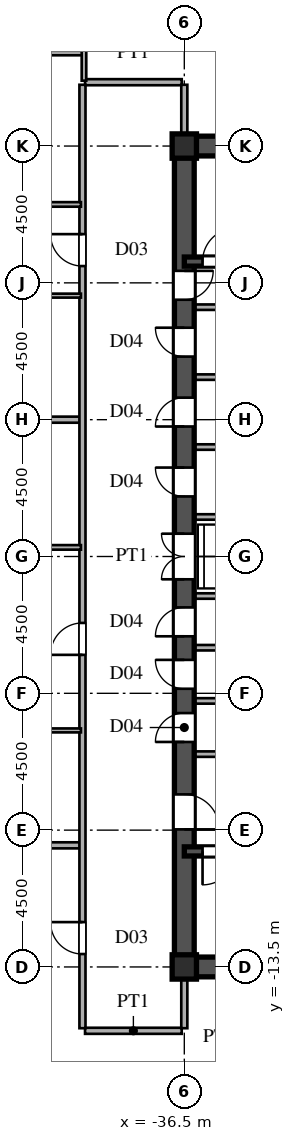
"""IFC4 building model, lengths in metres.
Left out: names, types, materials, properties, quantities, classifications, styles, units other than length and angle.
Written with IfcOpenShell. Run it as: python <this file> out.ifc"""

import sys

from ifc_helpers import new_model, si_unit, direction, frame, frame_2d, origin, origin_2d, place, context, subcontext, project, spatial, rectangle, i_section, extrude, source, transform, mapped, element, fill, save


model = new_model("IFC4")
c1 = context("Model", 3, precision=1e-05, world=origin(), true_north=direction((0.0, 1.0)))
c2 = subcontext(c1, "Body", "Model", "MODEL_VIEW")
j1 = project(units=[si_unit("LENGTHUNIT", "METRE"), si_unit("PLANEANGLEUNIT", "RADIAN")], contexts=[c1])
p1 = place(None, origin())
s1 = spatial("IfcSite", under=j1, at=p1, CompositionType="ELEMENT")
p2 = place(p1, origin())
s2 = spatial("IfcBuilding", under=s1, at=p2, CompositionType="ELEMENT")
p3 = place(p2, frame((0.0, 0.0, 80.1)))
s3 = spatial("IfcBuildingStorey", under=s2, at=p3, CompositionType="ELEMENT", Elevation=80.1)
m1 = source(origin(), c2, "Body", "SweptSolid", [
    extrude(i_section(OverallWidth=0.8, OverallDepth=0.8, WebThickness=0.032, FlangeThickness=0.05, at=origin_2d()), origin(), (0.0, 0.0, 1.0), 3.6),
])
for number, where, z_axis, x_axis in (
    (1, (-36.5, -13.5, 0.0), (0.0, 0.0, 1.0), (1.0, 0.0, 0.0)),
    (2, (-36.5, 13.5, 0.0), (0.0, 0.0, 1.0), (1.0, 0.0, 0.0)),
):
    element("IfcColumn", number, at=place(p3, frame(where, z_axis=z_axis, x_axis=x_axis)), inside=s3, PredefinedType="COLUMN", context=c2, shape_type="MappedRepresentation", body=[
        mapped(m1, transform((0.0, 0.0, 0.0), scale=1.0)),
    ])
for number, where, z_axis, x_axis in (
    (3, (-36.5, -13.5, 0.0), (0.0, 0.0, 1.0), (1.0, 0.0, 0.0)),
    (4, (-36.5, 13.5, 0.0), (0.0, 0.0, 1.0), (1.0, 0.0, 0.0)),
):
    element("IfcWall", number, at=place(p3, frame(where, z_axis=z_axis, x_axis=x_axis)), inside=s3, PredefinedType="SHEAR", context=c2, shape_type="SweptSolid", body=[
        extrude(rectangle(XDim=9.0, YDim=0.65, at=frame_2d((4.5, 0.0))), origin(), (0.0, 0.0, 1.0), 3.38),
    ])
p4 = place(p3, frame((-36.5, -13.65, 0.0), z_axis=(0.0, 0.0, 1.0), x_axis=(0.0, 1.0, 0.0)))
e5 = element("IfcWall", 5, at=p4, inside=s3, PredefinedType="SHEAR", context=c2, shape_type="SweptSolid", body=[
    extrude(rectangle(XDim=7.15, YDim=0.65, at=frame_2d((3.575, 0.0))), origin(), (0.0, 0.0, 1.0), 3.38),
])
p5 = place(p4, frame((4.675, 0.0, 0.0)))
e6 = element("IfcOpeningElement", 6, at=p5, cuts=e5, PredefinedType="OPENING", context=c2, shape_type="SweptSolid", body=[
    extrude(rectangle(XDim=1.15, YDim=2.2, at=frame_2d((0.575, 1.1))), frame((0.0, 0.335, 0.0), z_axis=(0.0, -1.0, 0.0), x_axis=(1.0, 0.0, 0.0)), (0.0, 0.0, 1.0), 0.67),
])
p6 = place(p3, frame((-36.5, -1.3, 0.0), z_axis=(0.0, 0.0, 1.0), x_axis=(0.0, 1.0, 0.0)))
e7 = element("IfcWall", 7, at=p6, inside=s3, PredefinedType="SHEAR", context=c2, shape_type="SweptSolid", body=[
    extrude(rectangle(XDim=2.6, YDim=0.65, at=frame_2d((1.3, 0.0))), origin(), (0.0, 0.0, 1.0), 3.38),
])
p7 = place(p6, frame((0.55, 0.0, 0.0)))
e8 = element("IfcOpeningElement", 8, at=p7, cuts=e7, PredefinedType="OPENING", context=c2, shape_type="SweptSolid", body=[
    extrude(rectangle(XDim=1.5, YDim=2.3, at=frame_2d((0.75, 1.15))), frame((0.0, 0.335, 0.0), z_axis=(0.0, -1.0, 0.0), x_axis=(1.0, 0.0, 0.0)), (0.0, 0.0, 1.0), 0.67),
])
p8 = place(p3, frame((-36.5, 8.2, 0.0), z_axis=(0.0, 0.0, 1.0), x_axis=(0.0, 1.0, 0.0)))
e9 = element("IfcWall", 9, at=p8, inside=s3, PredefinedType="SHEAR", context=c2, shape_type="SweptSolid", body=[
    extrude(rectangle(XDim=5.45, YDim=0.65, at=frame_2d((2.725, 0.0))), origin(), (0.0, 0.0, 1.0), 3.38),
])
p9 = place(p8, frame((0.245, 0.0, 0.0)))
e10 = element("IfcOpeningElement", 10, at=p9, cuts=e9, PredefinedType="OPENING", context=c2, shape_type="SweptSolid", body=[
    extrude(rectangle(XDim=0.95, YDim=2.15, at=frame_2d((0.475, 1.075))), frame((0.0, 0.335, 0.0), z_axis=(0.0, -1.0, 0.0), x_axis=(1.0, 0.0, 0.0)), (0.0, 0.0, 1.0), 0.67),
])
p10 = place(p3, frame((-36.5, -6.5, 0.0), z_axis=(0.0, 0.0, 1.0), x_axis=(0.0, 1.0, 0.0)))
e11 = element("IfcWall", 11, at=p10, inside=s3, PredefinedType="SHEAR", context=c2, shape_type="SweptSolid", body=[
    extrude(rectangle(XDim=1.75, YDim=0.65, at=frame_2d((0.875, 0.0))), origin(), (0.0, 0.0, 1.0), 3.38),
])
p11 = place(p10, frame((0.4, 0.0, 0.0)))
e12 = element("IfcOpeningElement", 12, at=p11, cuts=e11, PredefinedType="OPENING", context=c2, shape_type="SweptSolid", body=[
    extrude(rectangle(XDim=0.95, YDim=2.15, at=frame_2d((0.475, 1.075))), frame((0.0, 0.335, 0.0), z_axis=(0.0, -1.0, 0.0), x_axis=(1.0, 0.0, 0.0)), (0.0, 0.0, 1.0), 0.67),
])
p12 = place(p3, frame((-36.5, -4.75, 0.0), z_axis=(0.0, 0.0, 1.0), x_axis=(0.0, 1.0, 0.0)))
e13 = element("IfcWall", 13, at=p12, inside=s3, PredefinedType="SHEAR", context=c2, shape_type="SweptSolid", body=[
    extrude(rectangle(XDim=1.75, YDim=0.65, at=frame_2d((0.875, 0.0))), origin(), (0.0, 0.0, 1.0), 3.38),
])
p13 = place(p12, frame((0.4, 0.0, 0.0)))
e14 = element("IfcOpeningElement", 14, at=p13, cuts=e13, PredefinedType="OPENING", context=c2, shape_type="SweptSolid", body=[
    extrude(rectangle(XDim=0.95, YDim=2.15, at=frame_2d((0.475, 1.075))), frame((0.0, 0.335, 0.0), z_axis=(0.0, -1.0, 0.0), x_axis=(1.0, 0.0, 0.0)), (0.0, 0.0, 1.0), 0.67),
])
p14 = place(p3, frame((-36.5, -3.0, 0.0), z_axis=(0.0, 0.0, 1.0), x_axis=(0.0, 1.0, 0.0)))
e15 = element("IfcWall", 15, at=p14, inside=s3, PredefinedType="SHEAR", context=c2, shape_type="SweptSolid", body=[
    extrude(rectangle(XDim=1.7, YDim=0.65, at=frame_2d((0.85, 0.0))), origin(), (0.0, 0.0, 1.0), 3.38),
])
p15 = place(p14, frame((0.375, 0.0, 0.0)))
e16 = element("IfcOpeningElement", 16, at=p15, cuts=e15, PredefinedType="OPENING", context=c2, shape_type="SweptSolid", body=[
    extrude(rectangle(XDim=0.95, YDim=2.15, at=frame_2d((0.475, 1.075))), frame((0.0, 0.335, 0.0), z_axis=(0.0, -1.0, 0.0), x_axis=(1.0, 0.0, 0.0)), (0.0, 0.0, 1.0), 0.67),
])
p16 = place(p3, frame((-36.5, 1.3, 0.0), z_axis=(0.0, 0.0, 1.0), x_axis=(0.0, 1.0, 0.0)))
e17 = element("IfcWall", 17, at=p16, inside=s3, PredefinedType="SHEAR", context=c2, shape_type="SweptSolid", body=[
    extrude(rectangle(XDim=2.3, YDim=0.65, at=frame_2d((1.15, 0.0))), origin(), (0.0, 0.0, 1.0), 3.38),
])
p17 = place(p16, frame((0.675, 0.0, 0.0)))
e18 = element("IfcOpeningElement", 18, at=p17, cuts=e17, PredefinedType="OPENING", context=c2, shape_type="SweptSolid", body=[
    extrude(rectangle(XDim=0.95, YDim=2.15, at=frame_2d((0.475, 1.075))), frame((0.0, 0.335, 0.0), z_axis=(0.0, -1.0, 0.0), x_axis=(1.0, 0.0, 0.0)), (0.0, 0.0, 1.0), 0.67),
])
p18 = place(p3, frame((-36.5, 3.6, 0.0), z_axis=(0.0, 0.0, 1.0), x_axis=(0.0, 1.0, 0.0)))
e19 = element("IfcWall", 19, at=p18, inside=s3, PredefinedType="SHEAR", context=c2, shape_type="SweptSolid", body=[
    extrude(rectangle(XDim=2.3, YDim=0.65, at=frame_2d((1.15, 0.0))), origin(), (0.0, 0.0, 1.0), 3.38),
])
p19 = place(p18, frame((0.675, 0.0, 0.0)))
e20 = element("IfcOpeningElement", 20, at=p19, cuts=e19, PredefinedType="OPENING", context=c2, shape_type="SweptSolid", body=[
    extrude(rectangle(XDim=0.95, YDim=2.15, at=frame_2d((0.475, 1.075))), frame((0.0, 0.335, 0.0), z_axis=(0.0, -1.0, 0.0), x_axis=(1.0, 0.0, 0.0)), (0.0, 0.0, 1.0), 0.67),
])
p20 = place(p3, frame((-36.5, 5.9, 0.0), z_axis=(0.0, 0.0, 1.0), x_axis=(0.0, 1.0, 0.0)))
e21 = element("IfcWall", 21, at=p20, inside=s3, PredefinedType="SHEAR", context=c2, shape_type="SweptSolid", body=[
    extrude(rectangle(XDim=2.3, YDim=0.65, at=frame_2d((1.15, 0.0))), origin(), (0.0, 0.0, 1.0), 3.38),
])
p21 = place(p20, frame((0.675, 0.0, 0.0)))
e22 = element("IfcOpeningElement", 22, at=p21, cuts=e21, PredefinedType="OPENING", context=c2, shape_type="SweptSolid", body=[
    extrude(rectangle(XDim=0.95, YDim=2.15, at=frame_2d((0.475, 1.075))), frame((0.0, 0.335, 0.0), z_axis=(0.0, -1.0, 0.0), x_axis=(1.0, 0.0, 0.0)), (0.0, 0.0, 1.0), 0.67),
])
p22 = place(p3, frame((-36.5, -9.7, 0.0), z_axis=(0.0, 0.0, 1.0), x_axis=(1.0, 0.0, 0.0)))
e23 = element("IfcWall", 23, at=p22, inside=s3, PredefinedType="SHEAR", context=c2, shape_type="SweptSolid", body=[
    extrude(rectangle(XDim=9.0, YDim=0.3, at=frame_2d((4.5, 0.0))), origin(), (0.0, 0.0, 1.0), 3.38),
])
p23 = place(p22, frame((0.6, 0.0, 0.0)))
e24 = element("IfcOpeningElement", 24, at=p23, cuts=e23, PredefinedType="OPENING", context=c2, shape_type="SweptSolid", body=[
    extrude(rectangle(XDim=1.1, YDim=2.2, at=frame_2d((0.55, 1.1))), frame((0.0, 0.16, 0.0), z_axis=(0.0, -1.0, 0.0), x_axis=(1.0, 0.0, 0.0)), (0.0, 0.0, 1.0), 0.32),
])
p24 = place(p3, frame((-36.5, 9.7, 0.0), z_axis=(0.0, 0.0, 1.0), x_axis=(1.0, 0.0, 0.0)))
e25 = element("IfcWall", 25, at=p24, inside=s3, PredefinedType="SHEAR", context=c2, shape_type="SweptSolid", body=[
    extrude(rectangle(XDim=9.0, YDim=0.3, at=frame_2d((4.5, 0.0))), origin(), (0.0, 0.0, 1.0), 3.38),
])
p25 = place(p24, frame((0.6, 0.0, 0.0)))
e26 = element("IfcOpeningElement", 26, at=p25, cuts=e25, PredefinedType="OPENING", context=c2, shape_type="SweptSolid", body=[
    extrude(rectangle(XDim=1.1, YDim=2.2, at=frame_2d((0.55, 1.1))), frame((0.0, 0.16, 0.0), z_axis=(0.0, -1.0, 0.0), x_axis=(1.0, 0.0, 0.0)), (0.0, 0.0, 1.0), 0.32),
])
for number, where, z_axis, x_axis in (
    (27, (-36.15, -6.5, 0.0), (0.0, 0.0, 1.0), (1.0, 0.0, 0.0)),
    (28, (-36.15, 8.2, 0.0), (0.0, 0.0, 1.0), (1.0, 0.0, 0.0)),
):
    element("IfcWall", number, at=place(p3, frame(where, z_axis=z_axis, x_axis=x_axis)), inside=s3, PredefinedType="PARTITIONING", context=c2, shape_type="SweptSolid", body=[
        extrude(rectangle(XDim=5.7, YDim=0.18, at=frame_2d((2.85, 0.0))), origin(), (0.0, 0.0, 1.0), 3.38),
    ])
for number, where, z_axis, x_axis in (
    (29, (-36.15, -1.3, 0.0), (0.0, 0.0, 1.0), (1.0, 0.0, 0.0)),
    (30, (-36.15, 1.3, 0.0), (0.0, 0.0, 1.0), (1.0, 0.0, 0.0)),
    (31, (-36.15, -4.75, 0.0), (0.0, 0.0, 1.0), (1.0, 0.0, 0.0)),
    (32, (-36.15, -3.0, 0.0), (0.0, 0.0, 1.0), (1.0, 0.0, 0.0)),
    (33, (-36.15, 3.6, 0.0), (0.0, 0.0, 1.0), (1.0, 0.0, 0.0)),
    (34, (-36.15, 5.9, 0.0), (0.0, 0.0, 1.0), (1.0, 0.0, 0.0)),
):
    element("IfcWall", number, at=place(p3, frame(where, z_axis=z_axis, x_axis=x_axis)), inside=s3, PredefinedType="PARTITIONING", context=c2, shape_type="SweptSolid", body=[
        extrude(rectangle(XDim=2.95, YDim=0.18, at=frame_2d((1.475, 0.0))), origin(), (0.0, 0.0, 1.0), 3.38),
    ])
p26 = place(p3, frame((-39.765, -15.6, 0.0), z_axis=(0.0, 0.0, 1.0), x_axis=(1.0, 0.0, 0.0)))
e35 = element("IfcWall", 35, at=p26, inside=s3, PredefinedType="PARTITIONING", context=c2, shape_type="SweptSolid", body=[
    extrude(rectangle(XDim=3.18, YDim=0.2, at=frame_2d((1.59, 0.0))), origin(), (0.0, 0.0, 1.0), 3.38),
])
p27 = place(p3, frame((-66.568, -9.5, 0.0), z_axis=(0.0, 0.0, 1.0), x_axis=(1.0, 0.0, 0.0)))
e36 = element("IfcWall", 36, at=p27, inside=s3, PredefinedType="PARTITIONING", context=c2, shape_type="SweptSolid", body=[
    extrude(rectangle(XDim=26.638, YDim=0.2, at=frame_2d((13.319, 0.0))), origin(), (0.0, 0.0, 1.0), 3.38),
])
p28 = place(p3, frame((-45.45, -5.72, 0.0), z_axis=(0.0, 0.0, 1.0), x_axis=(1.0, 0.0, 0.0)))
e37 = element("IfcWall", 37, at=p28, inside=s3, PredefinedType="PARTITIONING", context=c2, shape_type="SweptSolid", body=[
    extrude(rectangle(XDim=5.55, YDim=0.13, at=frame_2d((2.775, 0.0))), origin(), (0.0, 0.0, 1.0), 3.38),
])
p29 = place(p28, frame((2.335, 0.0, 0.0)))
e38 = element("IfcOpeningElement", 38, at=p29, cuts=e37, PredefinedType="OPENING", context=c2, shape_type="SweptSolid", body=[
    extrude(rectangle(XDim=0.88, YDim=2.1, at=frame_2d((0.44, 1.05))), frame((0.0, 0.075, 0.0), z_axis=(0.0, -1.0, 0.0), x_axis=(1.0, 0.0, 0.0)), (0.0, 0.0, 1.0), 0.15),
])
p30 = place(p3, frame((-45.45, 0.3, 0.0), z_axis=(0.0, 0.0, 1.0), x_axis=(1.0, 0.0, 0.0)))
e39 = element("IfcWall", 39, at=p30, inside=s3, PredefinedType="PARTITIONING", context=c2, shape_type="SweptSolid", body=[
    extrude(rectangle(XDim=5.55, YDim=0.15, at=frame_2d((2.775, 0.0))), origin(), (0.0, 0.0, 1.0), 3.38),
])
p31 = place(p30, frame((2.3, 0.0, 0.0)))
e40 = element("IfcOpeningElement", 40, at=p31, cuts=e39, PredefinedType="OPENING", context=c2, shape_type="SweptSolid", body=[
    extrude(rectangle(XDim=0.95, YDim=2.15, at=frame_2d((0.475, 1.075))), frame((0.0, 0.085, 0.0), z_axis=(0.0, -1.0, 0.0), x_axis=(1.0, 0.0, 0.0)), (0.0, 0.0, 1.0), 0.17),
])
p32 = place(p3, frame((-54.52, 4.5, 0.0), z_axis=(0.0, 0.0, 1.0), x_axis=(1.0, 0.0, 0.0)))
e41 = element("IfcWall", 41, at=p32, inside=s3, PredefinedType="PARTITIONING", context=c2, shape_type="SweptSolid", body=[
    extrude(rectangle(XDim=14.59, YDim=0.2, at=frame_2d((7.295, 0.0))), origin(), (0.0, 0.0, 1.0), 2.68),
])
p33 = place(p3, frame((-45.45, 8.58, 0.0), z_axis=(0.0, 0.0, 1.0), x_axis=(1.0, 0.0, 0.0)))
e42 = element("IfcWall", 42, at=p33, inside=s3, PredefinedType="PARTITIONING", context=c2, shape_type="SweptSolid", body=[
    extrude(rectangle(XDim=5.55, YDim=0.13, at=frame_2d((2.775, 0.0))), origin(), (0.0, 0.0, 1.0), 3.38),
])
p34 = place(p33, frame((2.335, 0.0, 0.0)))
e43 = element("IfcOpeningElement", 43, at=p34, cuts=e42, PredefinedType="OPENING", context=c2, shape_type="SweptSolid", body=[
    extrude(rectangle(XDim=0.88, YDim=2.1, at=frame_2d((0.44, 1.05))), frame((0.0, 0.075, 0.0), z_axis=(0.0, -1.0, 0.0), x_axis=(1.0, 0.0, 0.0)), (0.0, 0.0, 1.0), 0.15),
])
p35 = place(p3, frame((-45.45, 11.58, 0.0), z_axis=(0.0, 0.0, 1.0), x_axis=(1.0, 0.0, 0.0)))
e44 = element("IfcWall", 44, at=p35, inside=s3, PredefinedType="PARTITIONING", context=c2, shape_type="SweptSolid", body=[
    extrude(rectangle(XDim=5.55, YDim=0.15, at=frame_2d((2.775, 0.0))), origin(), (0.0, 0.0, 1.0), 3.38),
])
p36 = place(p35, frame((2.3, 0.0, 0.0)))
e45 = element("IfcOpeningElement", 45, at=p36, cuts=e44, PredefinedType="OPENING", context=c2, shape_type="SweptSolid", body=[
    extrude(rectangle(XDim=0.95, YDim=2.15, at=frame_2d((0.475, 1.075))), frame((0.0, 0.085, 0.0), z_axis=(0.0, -1.0, 0.0), x_axis=(1.0, 0.0, 0.0)), (0.0, 0.0, 1.0), 0.17),
])
p37 = place(p3, frame((-39.765, 15.6, 0.0), z_axis=(0.0, 0.0, 1.0), x_axis=(1.0, 0.0, 0.0)))
e46 = element("IfcWall", 46, at=p37, inside=s3, PredefinedType="PARTITIONING", context=c2, shape_type="SweptSolid", body=[
    extrude(rectangle(XDim=3.18, YDim=0.2, at=frame_2d((1.59, 0.0))), origin(), (0.0, 0.0, 1.0), 3.38),
])
p38 = place(p3, frame((-45.45, 16.56, 0.0), z_axis=(0.0, 0.0, 1.0), x_axis=(1.0, 0.0, 0.0)))
e47 = element("IfcWall", 47, at=p38, inside=s3, PredefinedType="PARTITIONING", context=c2, shape_type="SweptSolid", body=[
    extrude(rectangle(XDim=5.6, YDim=0.15, at=frame_2d((2.8, 0.0))), origin(), (0.0, 0.0, 1.0), 3.38),
])
p39 = place(p3, frame((-39.85, -15.515, 0.0), z_axis=(0.0, 0.0, 1.0), x_axis=(0.0, 1.0, 0.0)))
e48 = element("IfcWall", 48, at=p39, inside=s3, PredefinedType="PARTITIONING", context=c2, shape_type="SweptSolid", body=[
    extrude(rectangle(XDim=31.03, YDim=0.2, at=frame_2d((15.515, 0.0))), origin(), (0.0, 0.0, 1.0), 3.38),
])
p40 = place(p39, frame((2.44, 0.0, 0.0)))
e49 = element("IfcOpeningElement", 49, at=p40, cuts=e48, PredefinedType="OPENING", context=c2, shape_type="SweptSolid", body=[
    extrude(rectangle(XDim=1.05, YDim=2.25, at=frame_2d((0.525, 1.125))), frame((0.0, 0.11, 0.0), z_axis=(0.0, -1.0, 0.0), x_axis=(1.0, 0.0, 0.0)), (0.0, 0.0, 1.0), 0.22),
])
p41 = place(p39, frame((12.28, 0.0, 0.0)))
e50 = element("IfcOpeningElement", 50, at=p41, cuts=e48, PredefinedType="OPENING", context=c2, shape_type="SweptSolid", body=[
    extrude(rectangle(XDim=1.05, YDim=2.25, at=frame_2d((0.525, 1.125))), frame((0.0, 0.11, 0.0), z_axis=(0.0, -1.0, 0.0), x_axis=(1.0, 0.0, 0.0)), (0.0, 0.0, 1.0), 0.22),
])
p42 = place(p39, frame((25.067, 0.0, 0.0)))
e51 = element("IfcOpeningElement", 51, at=p42, cuts=e48, PredefinedType="OPENING", context=c2, shape_type="SweptSolid", body=[
    extrude(rectangle(XDim=1.05, YDim=2.25, at=frame_2d((0.525, 1.125))), frame((0.0, 0.11, 0.0), z_axis=(0.0, -1.0, 0.0), x_axis=(1.0, 0.0, 0.0)), (0.0, 0.0, 1.0), 0.22),
])
p43 = place(p3, frame((-39.8, 15.65, 0.0), z_axis=(0.0, 0.0, 1.0), x_axis=(0.0, 1.0, 0.0)))
e52 = element("IfcWall", 52, at=p43, inside=s3, PredefinedType="PARTITIONING", context=c2, shape_type="SweptSolid", body=[
    extrude(rectangle(XDim=5.925, YDim=0.15, at=frame_2d((2.962, 0.0))), origin(), (0.0, 0.0, 1.0), 3.38),
])
p44 = place(p43, frame((1.904, 0.0, 0.0)))
e53 = element("IfcOpeningElement", 53, at=p44, cuts=e52, PredefinedType="OPENING", context=c2, shape_type="SweptSolid", body=[
    extrude(rectangle(XDim=0.95, YDim=2.15, at=frame_2d((0.475, 1.075))), frame((0.0, 0.085, 0.0), z_axis=(0.0, -1.0, 0.0), x_axis=(1.0, 0.0, 0.0)), (0.0, 0.0, 1.0), 0.17),
])
for number, where, z_axis, x_axis in (
    (54, (-36.5, -15.515, 0.0), (0.0, 0.0, 1.0), (0.0, 1.0, 0.0)),
    (55, (-36.5, 13.83, 0.0), (0.0, 0.0, 1.0), (0.0, 1.0, 0.0)),
):
    element("IfcWall", number, at=place(p3, frame(where, z_axis=z_axis, x_axis=x_axis)), inside=s3, PredefinedType="PARTITIONING", context=c2, shape_type="SweptSolid", body=[
        extrude(rectangle(XDim=1.685, YDim=0.2, at=frame_2d((0.842, 0.0))), origin(), (0.0, 0.0, 1.0), 2.68),
    ])
m2 = source(origin(), c2, "Body", "SweptSolid", [
    extrude(rectangle(XDim=1.15, YDim=2.2, at=frame_2d((0.575, 1.1))), frame((0.0, 0.025, 0.0), z_axis=(0.0, -1.0, 0.0), x_axis=(1.0, 0.0, 0.0)), (0.0, 0.0, 1.0), 0.05),
])
p45 = place(p5, frame((1.15, 0.0, 0.0), z_axis=(0.0, 0.0, 1.0), x_axis=(-1.0, 0.0, 0.0)))
e56 = element("IfcDoor", 56, at=p45, inside=s3, OperationType="SINGLE_SWING_LEFT", PredefinedType="DOOR", context=c2, shape_type="MappedRepresentation", body=[
    mapped(m2, transform((0.0, 0.0, 0.0), scale=1.0)),
])
fill(e6, e56)
m3 = source(origin(), c2, "Body", "SweptSolid", [
    extrude(rectangle(XDim=1.5, YDim=2.3, at=frame_2d((0.75, 1.15))), frame((0.0, 0.025, 0.0), z_axis=(0.0, -1.0, 0.0), x_axis=(1.0, 0.0, 0.0)), (0.0, 0.0, 1.0), 0.05),
])
p46 = place(p7, origin())
e57 = element("IfcDoor", 57, at=p46, inside=s3, OperationType="DOUBLE_SWING_LEFT", PredefinedType="DOOR", context=c2, shape_type="MappedRepresentation", body=[
    mapped(m3, transform((0.0, 0.0, 0.0), scale=1.0)),
])
fill(e8, e57)
m4 = source(origin(), c2, "Body", "SweptSolid", [
    extrude(rectangle(XDim=0.95, YDim=2.15, at=frame_2d((0.475, 1.075))), frame((0.0, 0.025, 0.0), z_axis=(0.0, -1.0, 0.0), x_axis=(1.0, 0.0, 0.0)), (0.0, 0.0, 1.0), 0.05),
])
p47 = place(p9, frame((0.95, 0.0, 0.0), z_axis=(0.0, 0.0, 1.0), x_axis=(-1.0, 0.0, 0.0)))
e58 = element("IfcDoor", 58, at=p47, inside=s3, OperationType="SINGLE_SWING_RIGHT", PredefinedType="DOOR", context=c2, shape_type="MappedRepresentation", body=[
    mapped(m4, transform((0.0, 0.0, 0.0), scale=1.0)),
])
fill(e10, e58)
p48 = place(p11, origin())
e59 = element("IfcDoor", 59, at=p48, inside=s3, OperationType="SINGLE_SWING_LEFT", PredefinedType="DOOR", context=c2, shape_type="MappedRepresentation", body=[
    mapped(m4, transform((0.0, 0.0, 0.0), scale=1.0)),
])
fill(e12, e59)
p49 = place(p13, origin())
e60 = element("IfcDoor", 60, at=p49, inside=s3, OperationType="SINGLE_SWING_RIGHT", PredefinedType="DOOR", context=c2, shape_type="MappedRepresentation", body=[
    mapped(m4, transform((0.0, 0.0, 0.0), scale=1.0)),
])
fill(e14, e60)
p50 = place(p15, origin())
e61 = element("IfcDoor", 61, at=p50, inside=s3, OperationType="SINGLE_SWING_LEFT", PredefinedType="DOOR", context=c2, shape_type="MappedRepresentation", body=[
    mapped(m4, transform((0.0, 0.0, 0.0), scale=1.0)),
])
fill(e16, e61)
p51 = place(p17, origin())
e62 = element("IfcDoor", 62, at=p51, inside=s3, OperationType="SINGLE_SWING_RIGHT", PredefinedType="DOOR", context=c2, shape_type="MappedRepresentation", body=[
    mapped(m4, transform((0.0, 0.0, 0.0), scale=1.0)),
])
fill(e18, e62)
p52 = place(p19, origin())
e63 = element("IfcDoor", 63, at=p52, inside=s3, OperationType="SINGLE_SWING_LEFT", PredefinedType="DOOR", context=c2, shape_type="MappedRepresentation", body=[
    mapped(m4, transform((0.0, 0.0, 0.0), scale=1.0)),
])
fill(e20, e63)
p53 = place(p21, origin())
e64 = element("IfcDoor", 64, at=p53, inside=s3, OperationType="SINGLE_SWING_RIGHT", PredefinedType="DOOR", context=c2, shape_type="MappedRepresentation", body=[
    mapped(m4, transform((0.0, 0.0, 0.0), scale=1.0)),
])
fill(e22, e64)
m5 = source(origin(), c2, "Body", "SweptSolid", [
    extrude(rectangle(XDim=1.1, YDim=2.2, at=frame_2d((0.55, 1.1))), frame((0.0, 0.025, 0.0), z_axis=(0.0, -1.0, 0.0), x_axis=(1.0, 0.0, 0.0)), (0.0, 0.0, 1.0), 0.05),
])
p54 = place(p23, frame((1.1, 0.0, 0.0), z_axis=(0.0, 0.0, 1.0), x_axis=(-1.0, 0.0, 0.0)))
e65 = element("IfcDoor", 65, at=p54, inside=s3, OperationType="SINGLE_SWING_LEFT", PredefinedType="DOOR", context=c2, shape_type="MappedRepresentation", body=[
    mapped(m5, transform((0.0, 0.0, 0.0), scale=1.0)),
])
fill(e24, e65)
p55 = place(p25, origin())
e66 = element("IfcDoor", 66, at=p55, inside=s3, OperationType="SINGLE_SWING_RIGHT", PredefinedType="DOOR", context=c2, shape_type="MappedRepresentation", body=[
    mapped(m5, transform((0.0, 0.0, 0.0), scale=1.0)),
])
fill(e26, e66)
m6 = source(origin(), c2, "Body", "SweptSolid", [
    extrude(rectangle(XDim=1.05, YDim=2.25, at=frame_2d((0.525, 1.125))), frame((0.0, 0.025, 0.0), z_axis=(0.0, -1.0, 0.0), x_axis=(1.0, 0.0, 0.0)), (0.0, 0.0, 1.0), 0.05),
])
p56 = place(p40, origin())
e67 = element("IfcDoor", 67, at=p56, inside=s3, OperationType="SINGLE_SWING_RIGHT", PredefinedType="DOOR", context=c2, shape_type="MappedRepresentation", body=[
    mapped(m6, transform((0.0, 0.0, 0.0), scale=1.0)),
])
fill(e49, e67)
p57 = place(p41, origin())
e68 = element("IfcDoor", 68, at=p57, inside=s3, OperationType="SINGLE_SWING_LEFT", PredefinedType="DOOR", context=c2, shape_type="MappedRepresentation", body=[
    mapped(m6, transform((0.0, 0.0, 0.0), scale=1.0)),
])
fill(e50, e68)
p58 = place(p42, origin())
e69 = element("IfcDoor", 69, at=p58, inside=s3, OperationType="SINGLE_SWING_RIGHT", PredefinedType="DOOR", context=c2, shape_type="MappedRepresentation", body=[
    mapped(m6, transform((0.0, 0.0, 0.0), scale=1.0)),
])
fill(e51, e69)
save(model, sys.argv[1])
